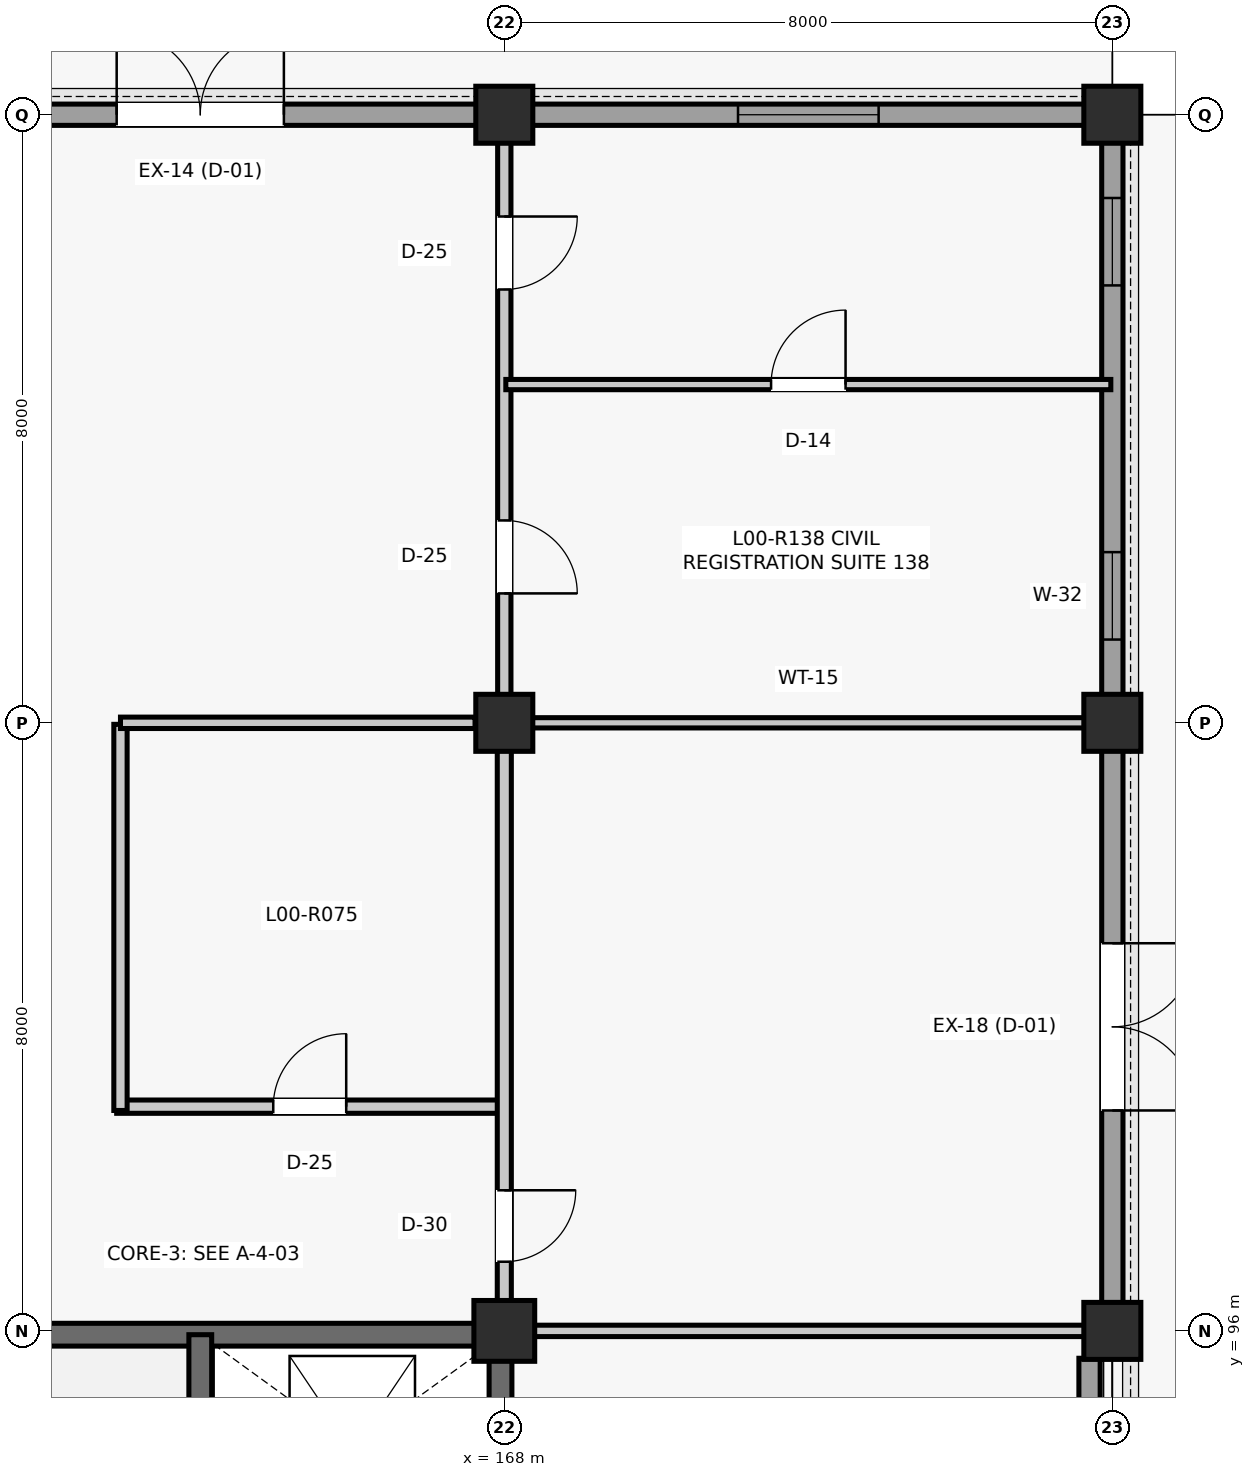
"""IFC4 building model, lengths in metres.
Left out: names, types, materials, properties, quantities, classifications, styles, units other than length and angle.
Written with IfcOpenShell. Run it as: python <this file> out.ifc"""

import sys

from ifc_helpers import new_model, si_unit, direction, frame, frame_2d, origin, origin_2d, place, context, subcontext, project, spatial, rectangle, extrude, element, fill, save


model = new_model("IFC4")
c1 = context("Model", 3, precision=1e-05, world=origin(), true_north=direction((0.0, 1.0)))
c2 = subcontext(c1, "Body", "Model", "MODEL_VIEW")
j1 = project(units=[si_unit("LENGTHUNIT", "METRE"), si_unit("PLANEANGLEUNIT", "RADIAN")], contexts=[c1])
p1 = place(None, origin())
s1 = spatial("IfcSite", under=j1, at=p1, CompositionType="ELEMENT")
p2 = place(p1, origin())
s2 = spatial("IfcBuilding", under=s1, at=p2, CompositionType="ELEMENT")
p3 = place(p2, origin())
s3 = spatial("IfcBuildingStorey", under=s2, at=p3, CompositionType="ELEMENT", Elevation=0.0)
p4 = place(p3, frame((168.0, 96.0, 0.0), z_axis=(0.0, 0.0, 1.0), x_axis=(1.0, 0.0, 0.0)))
e1 = element("IfcColumn", 1, at=p4, inside=s3, PredefinedType="COLUMN", context=c2, shape_type="SweptSolid", body=[
    extrude(rectangle(XDim=0.8, YDim=0.8, at=origin_2d()), origin(), (0.0, 0.0, 1.0), 5.28),
])
for number, where, z_axis, x_axis in (
    (2, (168.0, 104.0, 0.0), (0.0, 0.0, 1.0), (1.0, 0.0, 0.0)),
    (3, (168.0, 112.0, 0.0), (0.0, 0.0, 1.0), (1.0, 0.0, 0.0)),
    (4, (176.0, 96.0, 0.0), (0.0, 0.0, 1.0), (1.0, 0.0, 0.0)),
    (5, (176.0, 104.0, 0.0), (0.0, 0.0, 1.0), (1.0, 0.0, 0.0)),
    (6, (176.0, 112.0, 0.0), (0.0, 0.0, 1.0), (1.0, 0.0, 0.0)),
):
    element("IfcColumn", number, at=place(p3, frame(where, z_axis=z_axis, x_axis=x_axis)), inside=s3, PredefinedType="COLUMN", context=c2, shape_type="SweptSolid", body=[
        extrude(rectangle(XDim=0.75, YDim=0.75, at=origin_2d()), origin(), (0.0, 0.0, 1.0), 5.28),
    ])
p5 = place(p3, frame((160.36, 112.0, 0.0), z_axis=(0.0, 0.0, 1.0), x_axis=(1.0, 0.0, 0.0)))
e7 = element("IfcWall", 7, at=p5, inside=s3, PredefinedType="SOLIDWALL", context=c2, shape_type="SweptSolid", body=[
    extrude(rectangle(XDim=7.28, YDim=0.28, at=frame_2d((3.64, 0.0))), origin(), (0.0, 0.0, 1.0), 4.614),
])
p6 = place(p5, frame((2.54, 0.0, 0.0)))
e8 = element("IfcOpeningElement", 8, at=p6, cuts=e7, PredefinedType="OPENING", context=c2, shape_type="SweptSolid", body=[
    extrude(rectangle(XDim=2.2, YDim=2.5, at=frame_2d((1.1, 1.25))), frame((0.0, 0.15, 0.0), z_axis=(0.0, -1.0, 0.0), x_axis=(1.0, 0.0, 0.0)), (0.0, 0.0, 1.0), 0.3),
])
p7 = place(p3, frame((175.7, 88.36, 0.0), z_axis=(0.0, 0.0, 1.0), x_axis=(0.0, 1.0, 0.0)))
e9 = element("IfcWall", 9, at=p7, inside=s3, PredefinedType="SOLIDWALL", context=c2, shape_type="SweptSolid", body=[
    extrude(rectangle(XDim=7.28, YDim=0.28, at=frame_2d((3.64, 0.0))), origin(), (0.0, 0.0, 1.0), 4.674),
])
p8 = place(p3, frame((176.0, 96.36, 0.0), z_axis=(0.0, 0.0, 1.0), x_axis=(0.0, 1.0, 0.0)))
e10 = element("IfcWall", 10, at=p8, inside=s3, PredefinedType="SOLIDWALL", context=c2, shape_type="SweptSolid", body=[
    extrude(rectangle(XDim=7.28, YDim=0.28, at=frame_2d((3.64, 0.0))), origin(), (0.0, 0.0, 1.0), 4.614),
])
p9 = place(p8, frame((2.54, 0.0, 0.0)))
e11 = element("IfcOpeningElement", 11, at=p9, cuts=e10, PredefinedType="OPENING", context=c2, shape_type="SweptSolid", body=[
    extrude(rectangle(XDim=2.2, YDim=2.5, at=frame_2d((1.1, 1.25))), frame((0.0, 0.15, 0.0), z_axis=(0.0, -1.0, 0.0), x_axis=(1.0, 0.0, 0.0)), (0.0, 0.0, 1.0), 0.3),
])
p10 = place(p3, frame((168.36, 112.0, 0.0), z_axis=(0.0, 0.0, 1.0), x_axis=(1.0, 0.0, 0.0)))
e12 = element("IfcWall", 12, at=p10, inside=s3, PredefinedType="SOLIDWALL", context=c2, shape_type="SweptSolid", body=[
    extrude(rectangle(XDim=7.28, YDim=0.28, at=frame_2d((3.64, 0.0))), origin(), (0.0, 0.0, 1.0), 4.677),
])
p11 = place(p10, frame((2.715, 0.0, 0.9)))
e13 = element("IfcOpeningElement", 13, at=p11, cuts=e12, PredefinedType="OPENING", context=c2, shape_type="SweptSolid", body=[
    extrude(rectangle(XDim=1.85, YDim=2.65, at=frame_2d((0.925, 1.325))), frame((0.0, 0.15, 0.0), z_axis=(0.0, -1.0, 0.0), x_axis=(1.0, 0.0, 0.0)), (0.0, 0.0, 1.0), 0.3),
])
p12 = place(p3, frame((176.0, 104.36, 0.0), z_axis=(0.0, 0.0, 1.0), x_axis=(0.0, 1.0, 0.0)))
e14 = element("IfcWall", 14, at=p12, inside=s3, PredefinedType="SOLIDWALL", context=c2, shape_type="SweptSolid", body=[
    extrude(rectangle(XDim=7.28, YDim=0.28, at=frame_2d((3.64, 0.0))), origin(), (0.0, 0.0, 1.0), 4.677),
])
p13 = place(p12, frame((0.735, 0.0, 0.95)))
e15 = element("IfcOpeningElement", 15, at=p13, cuts=e14, PredefinedType="OPENING", context=c2, shape_type="SweptSolid", body=[
    extrude(rectangle(XDim=1.15, YDim=1.65, at=frame_2d((0.575, 0.825))), frame((0.0, 0.15, 0.0), z_axis=(0.0, -1.0, 0.0), x_axis=(1.0, 0.0, 0.0)), (0.0, 0.0, 1.0), 0.3),
])
p14 = place(p12, frame((5.395, 0.0, 0.95)))
e16 = element("IfcOpeningElement", 16, at=p14, cuts=e14, PredefinedType="OPENING", context=c2, shape_type="SweptSolid", body=[
    extrude(rectangle(XDim=1.15, YDim=1.65, at=frame_2d((0.575, 0.825))), frame((0.0, 0.15, 0.0), z_axis=(0.0, -1.0, 0.0), x_axis=(1.0, 0.0, 0.0)), (0.0, 0.0, 1.0), 0.3),
])
for number, where, z_axis, x_axis in (
    (17, (160.29, 95.95, 0.0), (0.0, 0.0, 1.0), (1.0, 0.0, 0.0)),
    (18, (167.95, 88.29, 0.0), (0.0, 0.0, 1.0), (0.0, 1.0, 0.0)),
):
    element("IfcWall", number, at=place(p3, frame(where, z_axis=z_axis, x_axis=x_axis)), inside=s3, PredefinedType="SHEAR", context=c2, shape_type="SweptSolid", body=[
        extrude(rectangle(XDim=7.42, YDim=0.3, at=frame_2d((3.71, 0.0))), origin(), (0.0, 0.0, 1.0), 5.035),
    ])
p15 = place(p3, frame((164.0, 88.05, 0.0), z_axis=(0.0, 0.0, 1.0), x_axis=(0.0, 1.0, 0.0)))
e19 = element("IfcWall", 19, at=p15, inside=s3, PredefinedType="SHEAR", context=c2, shape_type="SweptSolid", body=[
    extrude(rectangle(XDim=7.9, YDim=0.3, at=frame_2d((3.95, 0.0))), origin(), (0.0, 0.0, 1.0), 5.035),
])
p16 = place(p15, frame((0.55, 0.0, 0.0)))
e20 = element("IfcOpeningElement", 20, at=p16, cuts=e19, PredefinedType="OPENING", context=c2, shape_type="SweptSolid", body=[
    extrude(rectangle(XDim=1.1, YDim=2.15, at=frame_2d((0.55, 1.075))), frame((0.0, 0.16, 0.0), z_axis=(0.0, -1.0, 0.0), x_axis=(1.0, 0.0, 0.0)), (0.0, 0.0, 1.0), 0.32),
])
p17 = place(p3, frame((162.9, 98.95, 0.0), z_axis=(0.0, 0.0, 1.0), x_axis=(1.0, 0.0, 0.0)))
e21 = element("IfcWall", 21, at=p17, inside=s3, PredefinedType="PARTITIONING", context=c2, shape_type="SweptSolid", body=[
    extrude(rectangle(XDim=5.08, YDim=0.175, at=frame_2d((2.54, 0.0))), origin(), (0.0, 0.0, 1.0), 4.412),
])
p18 = place(p17, frame((2.06, 0.0, 0.0)))
e22 = element("IfcOpeningElement", 22, at=p18, cuts=e21, PredefinedType="OPENING", context=c2, shape_type="SweptSolid", body=[
    extrude(rectangle(XDim=0.96, YDim=2.14, at=frame_2d((0.48, 1.07))), frame((0.0, 0.097, 0.0), z_axis=(0.0, -1.0, 0.0), x_axis=(1.0, 0.0, 0.0)), (0.0, 0.0, 1.0), 0.195),
])
p19 = place(p3, frame((162.95, 98.9, 0.0), z_axis=(0.0, 0.0, 1.0), x_axis=(0.0, 1.0, 0.0)))
e23 = element("IfcWall", 23, at=p19, inside=s3, PredefinedType="PARTITIONING", context=c2, shape_type="SweptSolid", body=[
    extrude(rectangle(XDim=5.08, YDim=0.175, at=frame_2d((2.54, 0.0))), origin(), (0.0, 0.0, 1.0), 4.403),
])
p20 = place(p3, frame((162.95, 104.0, 0.0), z_axis=(0.0, 0.0, 1.0), x_axis=(1.0, 0.0, 0.0)))
e24 = element("IfcWall", 24, at=p20, inside=s3, PredefinedType="PARTITIONING", context=c2, shape_type="SweptSolid", body=[
    extrude(rectangle(XDim=4.665, YDim=0.15, at=frame_2d((2.333, 0.0))), origin(), (0.0, 0.0, 1.0), 4.403),
])
p21 = place(p3, frame((168.0, 96.39, 0.0), z_axis=(0.0, 0.0, 1.0), x_axis=(0.0, 1.0, 0.0)))
e25 = element("IfcWall", 25, at=p21, inside=s3, PredefinedType="PARTITIONING", context=c2, shape_type="SweptSolid", body=[
    extrude(rectangle(XDim=7.245, YDim=0.185, at=frame_2d((3.623, 0.0))), origin(), (0.0, 0.0, 1.0), 4.412),
])
p22 = place(p21, frame((0.52, 0.0, 0.0)))
e26 = element("IfcOpeningElement", 26, at=p22, cuts=e25, PredefinedType="OPENING", context=c2, shape_type="SweptSolid", body=[
    extrude(rectangle(XDim=0.94, YDim=2.12, at=frame_2d((0.47, 1.06))), frame((0.0, 0.103, 0.0), z_axis=(0.0, -1.0, 0.0), x_axis=(1.0, 0.0, 0.0)), (0.0, 0.0, 1.0), 0.205),
])
p23 = place(p3, frame((168.0, 104.365, 0.0), z_axis=(0.0, 0.0, 1.0), x_axis=(0.0, 1.0, 0.0)))
e27 = element("IfcWall", 27, at=p23, inside=s3, PredefinedType="PARTITIONING", context=c2, shape_type="SweptSolid", body=[
    extrude(rectangle(XDim=7.27, YDim=0.175, at=frame_2d((3.635, 0.0))), origin(), (0.0, 0.0, 1.0), 4.404),
])
p24 = place(p23, frame((1.337, 0.0, 0.0)))
e28 = element("IfcOpeningElement", 28, at=p24, cuts=e27, PredefinedType="OPENING", context=c2, shape_type="SweptSolid", body=[
    extrude(rectangle(XDim=0.96, YDim=2.14, at=frame_2d((0.48, 1.07))), frame((0.0, 0.097, 0.0), z_axis=(0.0, -1.0, 0.0), x_axis=(1.0, 0.0, 0.0)), (0.0, 0.0, 1.0), 0.195),
])
p25 = place(p23, frame((5.336, 0.0, 0.0)))
e29 = element("IfcOpeningElement", 29, at=p25, cuts=e27, PredefinedType="OPENING", context=c2, shape_type="SweptSolid", body=[
    extrude(rectangle(XDim=0.96, YDim=2.14, at=frame_2d((0.48, 1.07))), frame((0.0, 0.097, 0.0), z_axis=(0.0, -1.0, 0.0), x_axis=(1.0, 0.0, 0.0)), (0.0, 0.0, 1.0), 0.195),
])
p26 = place(p3, frame((168.39, 96.0, 0.0), z_axis=(0.0, 0.0, 1.0), x_axis=(1.0, 0.0, 0.0)))
e30 = element("IfcWall", 30, at=p26, inside=s3, PredefinedType="PARTITIONING", context=c2, shape_type="SweptSolid", body=[
    extrude(rectangle(XDim=7.245, YDim=0.15, at=frame_2d((3.623, 0.0))), origin(), (0.0, 0.0, 1.0), 4.403),
])
p27 = place(p3, frame((168.365, 104.0, 0.0), z_axis=(0.0, 0.0, 1.0), x_axis=(1.0, 0.0, 0.0)))
e31 = element("IfcWall", 31, at=p27, inside=s3, PredefinedType="PARTITIONING", context=c2, shape_type="SweptSolid", body=[
    extrude(rectangle(XDim=7.27, YDim=0.135, at=frame_2d((3.635, 0.0))), origin(), (0.0, 0.0, 1.0), 4.336),
])
p28 = place(p3, frame((168.02, 108.45, 0.0), z_axis=(0.0, 0.0, 1.0), x_axis=(1.0, 0.0, 0.0)))
e32 = element("IfcWall", 32, at=p28, inside=s3, PredefinedType="PARTITIONING", context=c2, shape_type="SweptSolid", body=[
    extrude(rectangle(XDim=7.96, YDim=0.135, at=frame_2d((3.98, 0.0))), origin(), (0.0, 0.0, 1.0), 4.404),
])
p29 = place(p28, frame((3.49, 0.0, 0.0)))
e33 = element("IfcOpeningElement", 33, at=p29, cuts=e32, PredefinedType="OPENING", context=c2, shape_type="SweptSolid", body=[
    extrude(rectangle(XDim=0.98, YDim=2.15, at=frame_2d((0.49, 1.075))), frame((0.0, 0.077, 0.0), z_axis=(0.0, -1.0, 0.0), x_axis=(1.0, 0.0, 0.0)), (0.0, 0.0, 1.0), 0.155),
])
p30 = place(p6, origin())
e34 = element("IfcDoor", 34, at=p30, inside=s3, OperationType="DOUBLE_DOOR_SINGLE_SWING", PredefinedType="DOOR", context=c2, shape_type="SweptSolid", body=[
    extrude(rectangle(XDim=2.2, YDim=2.5, at=frame_2d((1.1, 1.25))), frame((0.0, 0.025, 0.0), z_axis=(0.0, -1.0, 0.0), x_axis=(1.0, 0.0, 0.0)), (0.0, 0.0, 1.0), 0.05),
])
fill(e8, e34)
p31 = place(p9, frame((2.2, 0.0, 0.0), z_axis=(0.0, 0.0, 1.0), x_axis=(-1.0, 0.0, 0.0)))
e35 = element("IfcDoor", 35, at=p31, inside=s3, OperationType="DOUBLE_DOOR_SINGLE_SWING", PredefinedType="DOOR", context=c2, shape_type="SweptSolid", body=[
    extrude(rectangle(XDim=2.2, YDim=2.5, at=frame_2d((1.1, 1.25))), frame((0.0, 0.025, 0.0), z_axis=(0.0, -1.0, 0.0), x_axis=(1.0, 0.0, 0.0)), (0.0, 0.0, 1.0), 0.05),
])
fill(e11, e35)
p32 = place(p11, origin())
e36 = element("IfcWindow", 36, at=p32, inside=s3, PartitioningType="SINGLE_PANEL", PredefinedType="WINDOW", context=c2, shape_type="SweptSolid", body=[
    extrude(rectangle(XDim=1.85, YDim=2.65, at=frame_2d((0.925, 1.325))), frame((0.0, 0.03, 0.0), z_axis=(0.0, -1.0, 0.0), x_axis=(1.0, 0.0, 0.0)), (0.0, 0.0, 1.0), 0.06),
])
fill(e13, e36)
p33 = place(p13, origin())
e37 = element("IfcWindow", 37, at=p33, inside=s3, PartitioningType="SINGLE_PANEL", PredefinedType="WINDOW", context=c2, shape_type="SweptSolid", body=[
    extrude(rectangle(XDim=1.15, YDim=1.65, at=frame_2d((0.575, 0.825))), frame((0.0, 0.03, 0.0), z_axis=(0.0, -1.0, 0.0), x_axis=(1.0, 0.0, 0.0)), (0.0, 0.0, 1.0), 0.06),
])
fill(e15, e37)
p34 = place(p14, origin())
e38 = element("IfcWindow", 38, at=p34, inside=s3, PartitioningType="SINGLE_PANEL", PredefinedType="WINDOW", context=c2, shape_type="SweptSolid", body=[
    extrude(rectangle(XDim=1.15, YDim=1.65, at=frame_2d((0.575, 0.825))), frame((0.0, 0.03, 0.0), z_axis=(0.0, -1.0, 0.0), x_axis=(1.0, 0.0, 0.0)), (0.0, 0.0, 1.0), 0.06),
])
fill(e16, e38)
p35 = place(p18, origin())
e39 = element("IfcDoor", 39, at=p35, inside=s3, OperationType="SINGLE_SWING_RIGHT", PredefinedType="DOOR", context=c2, shape_type="SweptSolid", body=[
    extrude(rectangle(XDim=0.96, YDim=2.14, at=frame_2d((0.48, 1.07))), frame((0.0, 0.025, 0.0), z_axis=(0.0, -1.0, 0.0), x_axis=(1.0, 0.0, 0.0)), (0.0, 0.0, 1.0), 0.05),
])
fill(e22, e39)
p36 = place(p22, frame((0.94, 0.0, 0.0), z_axis=(0.0, 0.0, 1.0), x_axis=(-1.0, 0.0, 0.0)))
e40 = element("IfcDoor", 40, at=p36, inside=s3, OperationType="SINGLE_SWING_RIGHT", PredefinedType="DOOR", context=c2, shape_type="SweptSolid", body=[
    extrude(rectangle(XDim=0.94, YDim=2.12, at=frame_2d((0.47, 1.06))), frame((0.0, 0.025, 0.0), z_axis=(0.0, -1.0, 0.0), x_axis=(1.0, 0.0, 0.0)), (0.0, 0.0, 1.0), 0.05),
])
fill(e26, e40)
p37 = place(p24, frame((0.96, 0.0, 0.0), z_axis=(0.0, 0.0, 1.0), x_axis=(-1.0, 0.0, 0.0)))
e41 = element("IfcDoor", 41, at=p37, inside=s3, OperationType="SINGLE_SWING_LEFT", PredefinedType="DOOR", context=c2, shape_type="SweptSolid", body=[
    extrude(rectangle(XDim=0.96, YDim=2.14, at=frame_2d((0.48, 1.07))), frame((0.0, 0.025, 0.0), z_axis=(0.0, -1.0, 0.0), x_axis=(1.0, 0.0, 0.0)), (0.0, 0.0, 1.0), 0.05),
])
fill(e28, e41)
p38 = place(p25, frame((0.96, 0.0, 0.0), z_axis=(0.0, 0.0, 1.0), x_axis=(-1.0, 0.0, 0.0)))
e42 = element("IfcDoor", 42, at=p38, inside=s3, OperationType="SINGLE_SWING_RIGHT", PredefinedType="DOOR", context=c2, shape_type="SweptSolid", body=[
    extrude(rectangle(XDim=0.96, YDim=2.14, at=frame_2d((0.48, 1.07))), frame((0.0, 0.025, 0.0), z_axis=(0.0, -1.0, 0.0), x_axis=(1.0, 0.0, 0.0)), (0.0, 0.0, 1.0), 0.05),
])
fill(e29, e42)
p39 = place(p29, origin())
e43 = element("IfcDoor", 43, at=p39, inside=s3, OperationType="SINGLE_SWING_RIGHT", PredefinedType="DOOR", context=c2, shape_type="SweptSolid", body=[
    extrude(rectangle(XDim=0.98, YDim=2.15, at=frame_2d((0.49, 1.075))), frame((0.0, 0.025, 0.0), z_axis=(0.0, -1.0, 0.0), x_axis=(1.0, 0.0, 0.0)), (0.0, 0.0, 1.0), 0.05),
])
fill(e33, e43)
save(model, sys.argv[1])
